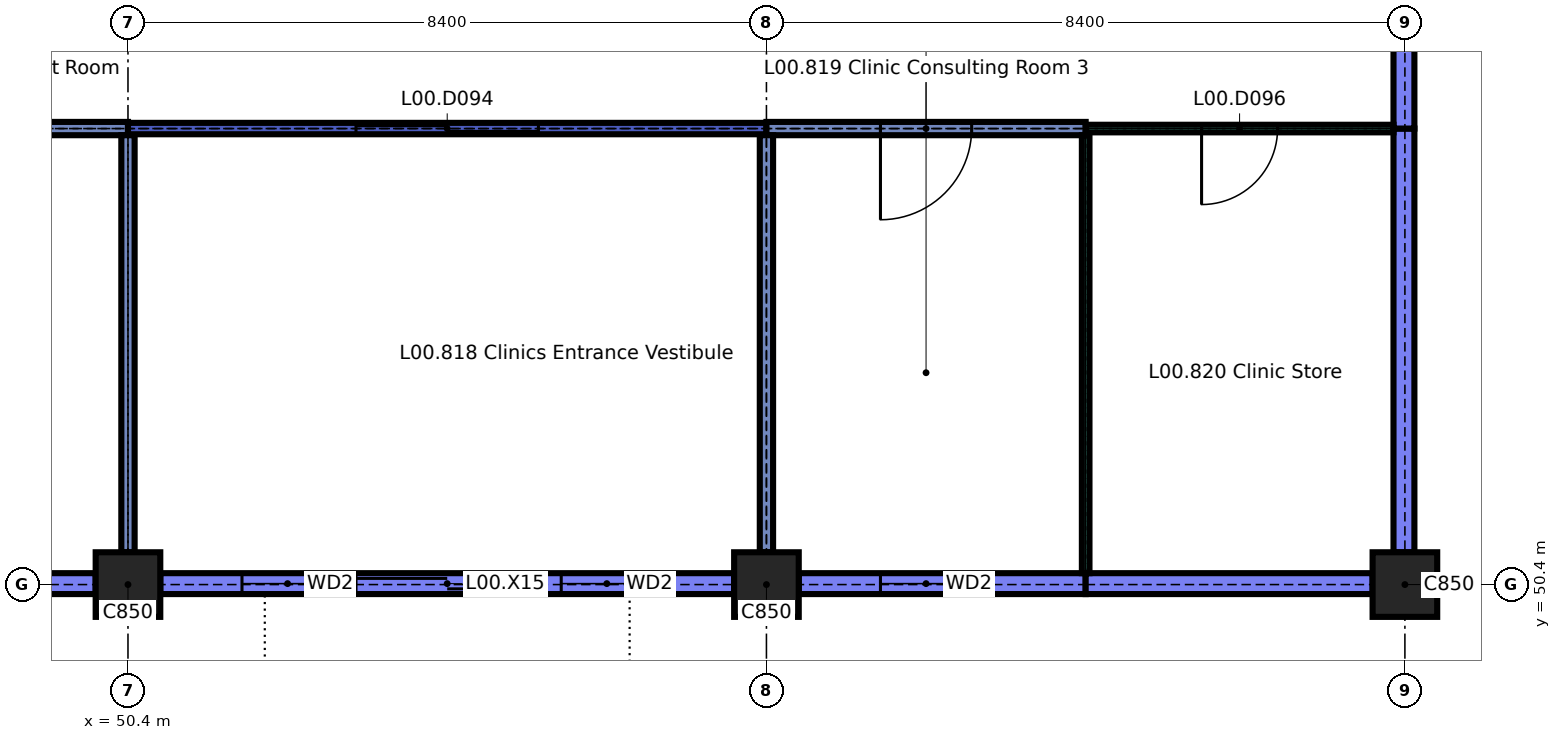
"""IFC4 building model, lengths in metres.
Left out: names, types, materials, properties, quantities, classifications, styles, units other than length and angle.
Written with IfcOpenShell. Run it as: python <this file> out.ifc"""

import sys

from ifc_helpers import new_model, si_unit, direction, frame, frame_2d, origin, origin_2d, place, context, subcontext, project, spatial, rectangle, extrude, element, fill, save


model = new_model("IFC4")
c1 = context("Model", 3, precision=1e-05, world=origin(), true_north=direction((0.0, 1.0)))
c2 = subcontext(c1, "Body", "Model", "MODEL_VIEW")
j1 = project(units=[si_unit("LENGTHUNIT", "METRE"), si_unit("PLANEANGLEUNIT", "RADIAN")], contexts=[c1])
p1 = place(None, origin())
s1 = spatial("IfcSite", under=j1, at=p1, CompositionType="ELEMENT")
p2 = place(p1, origin())
s2 = spatial("IfcBuilding", under=s1, at=p2, CompositionType="ELEMENT")
p3 = place(p2, origin())
s3 = spatial("IfcBuildingStorey", under=s2, at=p3, CompositionType="ELEMENT", Elevation=0.0)
for number, where, z_axis, x_axis in (
    (1, (50.4, 50.4, 0.0), (0.0, 0.0, 1.0), (1.0, 0.0, 0.0)),
    (2, (58.8, 50.4, 0.0), (0.0, 0.0, 1.0), (1.0, 0.0, 0.0)),
    (3, (67.2, 50.4, 0.0), (0.0, 0.0, 1.0), (1.0, 0.0, 0.0)),
):
    element("IfcColumn", number, at=place(p3, frame(where, z_axis=z_axis, x_axis=x_axis)), inside=s3, PredefinedType="COLUMN", context=c2, shape_type="SweptSolid", body=[
        extrude(rectangle(XDim=0.85, YDim=0.85, at=origin_2d()), origin(), (0.0, 0.0, 1.0), 4.14),
    ])
p4 = place(p3, frame((46.2, 50.413, 0.0), z_axis=(0.0, 0.0, 1.0), x_axis=(1.0, 0.0, 0.0)))
e4 = element("IfcWall", 4, at=p4, inside=s3, PredefinedType="SOLIDWALL", context=c2, shape_type="SweptSolid", body=[
    extrude(rectangle(XDim=3.775, YDim=0.275, at=frame_2d((1.888, 0.0))), origin(), (0.0, 0.0, 1.0), 3.84),
])
p5 = place(p4, frame((1.5, 0.0, 0.9)))
e5 = element("IfcOpeningElement", 5, at=p5, cuts=e4, PredefinedType="OPENING", context=c2, shape_type="SweptSolid", body=[
    extrude(rectangle(XDim=1.2, YDim=2.1, at=frame_2d((0.6, 1.05))), frame((0.0, 0.147, 0.0), z_axis=(0.0, -1.0, 0.0), x_axis=(1.0, 0.0, 0.0)), (0.0, 0.0, 1.0), 0.295),
])
p6 = place(p3, frame((50.825, 50.413, 0.0), z_axis=(0.0, 0.0, 1.0), x_axis=(1.0, 0.0, 0.0)))
e6 = element("IfcWall", 6, at=p6, inside=s3, PredefinedType="SOLIDWALL", context=c2, shape_type="SweptSolid", body=[
    extrude(rectangle(XDim=7.55, YDim=0.275, at=frame_2d((3.775, 0.0))), origin(), (0.0, 0.0, 1.0), 3.84),
])
p7 = place(p6, frame((1.075, 0.0, 0.9)))
e7 = element("IfcOpeningElement", 7, at=p7, cuts=e6, PredefinedType="OPENING", context=c2, shape_type="SweptSolid", body=[
    extrude(rectangle(XDim=1.2, YDim=2.1, at=frame_2d((0.6, 1.05))), frame((0.0, 0.147, 0.0), z_axis=(0.0, -1.0, 0.0), x_axis=(1.0, 0.0, 0.0)), (0.0, 0.0, 1.0), 0.295),
])
p8 = place(p6, frame((5.275, 0.0, 0.9)))
e8 = element("IfcOpeningElement", 8, at=p8, cuts=e6, PredefinedType="OPENING", context=c2, shape_type="SweptSolid", body=[
    extrude(rectangle(XDim=1.2, YDim=2.1, at=frame_2d((0.6, 1.05))), frame((0.0, 0.147, 0.0), z_axis=(0.0, -1.0, 0.0), x_axis=(1.0, 0.0, 0.0)), (0.0, 0.0, 1.0), 0.295),
])
p9 = place(p6, frame((2.575, 0.0, 0.0)))
e9 = element("IfcOpeningElement", 9, at=p9, cuts=e6, PredefinedType="OPENING", context=c2, shape_type="SweptSolid", body=[
    extrude(rectangle(XDim=2.4, YDim=3.0, at=frame_2d((1.2, 1.5))), frame((0.0, 0.147, 0.0), z_axis=(0.0, -1.0, 0.0), x_axis=(1.0, 0.0, 0.0)), (0.0, 0.0, 1.0), 0.295),
])
p10 = place(p3, frame((59.225, 50.413, 0.0), z_axis=(0.0, 0.0, 1.0), x_axis=(1.0, 0.0, 0.0)))
e10 = element("IfcWall", 10, at=p10, inside=s3, PredefinedType="SOLIDWALL", context=c2, shape_type="SweptSolid", body=[
    extrude(rectangle(XDim=3.775, YDim=0.275, at=frame_2d((1.887, 0.0))), origin(), (0.0, 0.0, 1.0), 3.84),
])
p11 = place(p10, frame((1.075, 0.0, 0.9)))
e11 = element("IfcOpeningElement", 11, at=p11, cuts=e10, PredefinedType="OPENING", context=c2, shape_type="SweptSolid", body=[
    extrude(rectangle(XDim=1.2, YDim=2.1, at=frame_2d((0.6, 1.05))), frame((0.0, 0.147, 0.0), z_axis=(0.0, -1.0, 0.0), x_axis=(1.0, 0.0, 0.0)), (0.0, 0.0, 1.0), 0.295),
])
p12 = place(p3, frame((63.0, 50.413, 0.0), z_axis=(0.0, 0.0, 1.0), x_axis=(1.0, 0.0, 0.0)))
e12 = element("IfcWall", 12, at=p12, inside=s3, PredefinedType="SOLIDWALL", context=c2, shape_type="SweptSolid", body=[
    extrude(rectangle(XDim=3.775, YDim=0.275, at=frame_2d((1.887, 0.0))), origin(), (0.0, 0.0, 1.0), 3.84),
])
p13 = place(p3, frame((67.188, 50.825, 0.0), z_axis=(0.0, 0.0, 1.0), x_axis=(0.0, 1.0, 0.0)))
e13 = element("IfcWall", 13, at=p13, inside=s3, PredefinedType="SOLIDWALL", context=c2, shape_type="SweptSolid", body=[
    extrude(rectangle(XDim=5.575, YDim=0.275, at=frame_2d((2.788, 0.0))), origin(), (0.0, 0.0, 1.0), 3.84),
])
p14 = place(p3, frame((67.188, 56.4, 0.0), z_axis=(0.0, 0.0, 1.0), x_axis=(0.0, 1.0, 0.0)))
e14 = element("IfcWall", 14, at=p14, inside=s3, PredefinedType="SOLIDWALL", context=c2, shape_type="SweptSolid", body=[
    extrude(rectangle(XDim=1.975, YDim=0.275, at=frame_2d((0.988, 0.0))), origin(), (0.0, 0.0, 1.0), 3.84),
])
p15 = place(p3, frame((33.75, 56.4, 0.0), z_axis=(0.0, 0.0, 1.0), x_axis=(1.0, 0.0, 0.0)))
e15 = element("IfcWall", 15, at=p15, inside=s3, PredefinedType="PARTITIONING", context=c2, shape_type="SweptSolid", body=[
    extrude(rectangle(XDim=16.65, YDim=0.175, at=frame_2d((8.325, 0.0))), origin(), (0.0, 0.0, 1.0), 4.14),
])
p16 = place(p15, frame((1.425, 0.0, 0.0)))
e16 = element("IfcOpeningElement", 16, at=p16, cuts=e15, PredefinedType="OPENING", context=c2, shape_type="SweptSolid", body=[
    extrude(rectangle(XDim=1.2, YDim=2.1, at=frame_2d((0.6, 1.05))), frame((0.0, 0.097, 0.0), z_axis=(0.0, -1.0, 0.0), x_axis=(1.0, 0.0, 0.0)), (0.0, 0.0, 1.0), 0.195),
])
p17 = place(p15, frame((5.55, 0.0, 0.0)))
e17 = element("IfcOpeningElement", 17, at=p17, cuts=e15, PredefinedType="OPENING", context=c2, shape_type="SweptSolid", body=[
    extrude(rectangle(XDim=1.2, YDim=2.1, at=frame_2d((0.6, 1.05))), frame((0.0, 0.097, 0.0), z_axis=(0.0, -1.0, 0.0), x_axis=(1.0, 0.0, 0.0)), (0.0, 0.0, 1.0), 0.195),
])
p18 = place(p15, frame((9.75, 0.0, 0.0)))
e18 = element("IfcOpeningElement", 18, at=p18, cuts=e15, PredefinedType="OPENING", context=c2, shape_type="SweptSolid", body=[
    extrude(rectangle(XDim=1.2, YDim=2.1, at=frame_2d((0.6, 1.05))), frame((0.0, 0.097, 0.0), z_axis=(0.0, -1.0, 0.0), x_axis=(1.0, 0.0, 0.0)), (0.0, 0.0, 1.0), 0.195),
])
p19 = place(p15, frame((13.95, 0.0, 0.0)))
e19 = element("IfcOpeningElement", 19, at=p19, cuts=e15, PredefinedType="OPENING", context=c2, shape_type="SweptSolid", body=[
    extrude(rectangle(XDim=1.2, YDim=2.1, at=frame_2d((0.6, 1.05))), frame((0.0, 0.097, 0.0), z_axis=(0.0, -1.0, 0.0), x_axis=(1.0, 0.0, 0.0)), (0.0, 0.0, 1.0), 0.195),
])
p20 = place(p3, frame((50.4, 56.4, 0.0), z_axis=(0.0, 0.0, 1.0), x_axis=(1.0, 0.0, 0.0)))
e20 = element("IfcWall", 20, at=p20, inside=s3, PredefinedType="PARTITIONING", context=c2, shape_type="SweptSolid", body=[
    extrude(rectangle(XDim=8.4, YDim=0.15, at=frame_2d((4.2, 0.0))), origin(), (0.0, 0.0, 1.0), 4.14),
])
p21 = place(p20, frame((3.0, 0.0, 0.0)))
e21 = element("IfcOpeningElement", 21, at=p21, cuts=e20, PredefinedType="OPENING", context=c2, shape_type="SweptSolid", body=[
    extrude(rectangle(XDim=2.4, YDim=2.4, at=frame_2d((1.2, 1.2))), frame((0.0, 0.085, 0.0), z_axis=(0.0, -1.0, 0.0), x_axis=(1.0, 0.0, 0.0)), (0.0, 0.0, 1.0), 0.17),
])
p22 = place(p3, frame((58.8, 56.4, 0.0), z_axis=(0.0, 0.0, 1.0), x_axis=(1.0, 0.0, 0.0)))
e22 = element("IfcWall", 22, at=p22, inside=s3, PredefinedType="PARTITIONING", context=c2, shape_type="SweptSolid", body=[
    extrude(rectangle(XDim=4.2, YDim=0.175, at=frame_2d((2.1, 0.0))), origin(), (0.0, 0.0, 1.0), 4.14),
])
p23 = place(p22, frame((1.5, 0.0, 0.0)))
e23 = element("IfcOpeningElement", 23, at=p23, cuts=e22, PredefinedType="OPENING", context=c2, shape_type="SweptSolid", body=[
    extrude(rectangle(XDim=1.2, YDim=2.1, at=frame_2d((0.6, 1.05))), frame((0.0, 0.097, 0.0), z_axis=(0.0, -1.0, 0.0), x_axis=(1.0, 0.0, 0.0)), (0.0, 0.0, 1.0), 0.195),
])
p24 = place(p3, frame((63.0, 56.4, 0.0), z_axis=(0.0, 0.0, 1.0), x_axis=(1.0, 0.0, 0.0)))
e24 = element("IfcWall", 24, at=p24, inside=s3, PredefinedType="PARTITIONING", context=c2, shape_type="SweptSolid", body=[
    extrude(rectangle(XDim=4.05, YDim=0.1, at=frame_2d((2.025, 0.0))), origin(), (0.0, 0.0, 1.0), 4.14),
])
p25 = place(p24, frame((1.525, 0.0, 0.0)))
e25 = element("IfcOpeningElement", 25, at=p25, cuts=e24, PredefinedType="OPENING", context=c2, shape_type="SweptSolid", body=[
    extrude(rectangle(XDim=1.0, YDim=2.1, at=frame_2d((0.5, 1.05))), frame((0.0, 0.06, 0.0), z_axis=(0.0, -1.0, 0.0), x_axis=(1.0, 0.0, 0.0)), (0.0, 0.0, 1.0), 0.12),
])
for number, where, z_axis, x_axis in (
    (26, (50.4, 50.825, 0.0), (0.0, 0.0, 1.0), (0.0, 1.0, 0.0)),
    (27, (58.8, 50.825, 0.0), (0.0, 0.0, 1.0), (0.0, 1.0, 0.0)),
):
    element("IfcWall", number, at=place(p3, frame(where, z_axis=z_axis, x_axis=x_axis)), inside=s3, PredefinedType="PARTITIONING", context=c2, shape_type="SweptSolid", body=[
        extrude(rectangle(XDim=5.488, YDim=0.175, at=frame_2d((2.744, 0.0))), origin(), (0.0, 0.0, 1.0), 4.14),
    ])
p26 = place(p3, frame((63.0, 50.55, 0.0), z_axis=(0.0, 0.0, 1.0), x_axis=(0.0, 1.0, 0.0)))
e28 = element("IfcWall", 28, at=p26, inside=s3, PredefinedType="PARTITIONING", context=c2, shape_type="SweptSolid", body=[
    extrude(rectangle(XDim=5.762, YDim=0.1, at=frame_2d((2.881, 0.0))), origin(), (0.0, 0.0, 1.0), 4.14),
])
p27 = place(p7, origin())
e29 = element("IfcWindow", 29, at=p27, inside=s3, PartitioningType="SINGLE_PANEL", PredefinedType="WINDOW", context=c2, shape_type="SweptSolid", body=[
    extrude(rectangle(XDim=1.2, YDim=2.1, at=frame_2d((0.6, 1.05))), frame((0.0, 0.03, 0.0), z_axis=(0.0, -1.0, 0.0), x_axis=(1.0, 0.0, 0.0)), (0.0, 0.0, 1.0), 0.06),
])
fill(e7, e29)
p28 = place(p8, origin())
e30 = element("IfcWindow", 30, at=p28, inside=s3, PartitioningType="SINGLE_PANEL", PredefinedType="WINDOW", context=c2, shape_type="SweptSolid", body=[
    extrude(rectangle(XDim=1.2, YDim=2.1, at=frame_2d((0.6, 1.05))), frame((0.0, 0.03, 0.0), z_axis=(0.0, -1.0, 0.0), x_axis=(1.0, 0.0, 0.0)), (0.0, 0.0, 1.0), 0.06),
])
fill(e8, e30)
p29 = place(p9, frame((2.4, 0.0, 0.0), x_axis=(-1.0, 0.0, 0.0)))
e31 = element("IfcDoor", 31, at=p29, inside=s3, OperationType="DOUBLE_DOOR_SLIDING", PredefinedType="DOOR", context=c2, shape_type="SweptSolid", body=[
    extrude(rectangle(XDim=2.4, YDim=3.0, at=frame_2d((1.2, 1.5))), frame((0.0, 0.06, 0.0), z_axis=(0.0, -1.0, 0.0), x_axis=(1.0, 0.0, 0.0)), (0.0, 0.0, 1.0), 0.12),
])
fill(e9, e31)
p30 = place(p11, origin())
e32 = element("IfcWindow", 32, at=p30, inside=s3, PartitioningType="SINGLE_PANEL", PredefinedType="WINDOW", context=c2, shape_type="SweptSolid", body=[
    extrude(rectangle(XDim=1.2, YDim=2.1, at=frame_2d((0.6, 1.05))), frame((0.0, 0.03, 0.0), z_axis=(0.0, -1.0, 0.0), x_axis=(1.0, 0.0, 0.0)), (0.0, 0.0, 1.0), 0.06),
])
fill(e11, e32)
p31 = place(p21, origin())
e33 = element("IfcDoor", 33, at=p31, inside=s3, OperationType="DOUBLE_DOOR_SLIDING", PredefinedType="DOOR", context=c2, shape_type="SweptSolid", body=[
    extrude(rectangle(XDim=2.4, YDim=2.4, at=frame_2d((1.2, 1.2))), frame((0.0, 0.025, 0.0), z_axis=(0.0, -1.0, 0.0), x_axis=(1.0, 0.0, 0.0)), (0.0, 0.0, 1.0), 0.05),
])
fill(e21, e33)
p32 = place(p23, origin())
e34 = element("IfcDoor", 34, at=p32, inside=s3, OperationType="SINGLE_SWING_LEFT", PredefinedType="DOOR", context=c2, shape_type="SweptSolid", body=[
    extrude(rectangle(XDim=1.2, YDim=2.1, at=frame_2d((0.6, 1.05))), frame((0.0, 0.035, 0.0), z_axis=(0.0, -1.0, 0.0), x_axis=(1.0, 0.0, 0.0)), (0.0, 0.0, 1.0), 0.07),
])
fill(e23, e34)
p33 = place(p25, origin())
e35 = element("IfcDoor", 35, at=p33, inside=s3, OperationType="SINGLE_SWING_LEFT", PredefinedType="DOOR", context=c2, shape_type="SweptSolid", body=[
    extrude(rectangle(XDim=1.0, YDim=2.1, at=frame_2d((0.5, 1.05))), frame((0.0, 0.025, 0.0), z_axis=(0.0, -1.0, 0.0), x_axis=(1.0, 0.0, 0.0)), (0.0, 0.0, 1.0), 0.05),
])
fill(e25, e35)
save(model, sys.argv[1])
